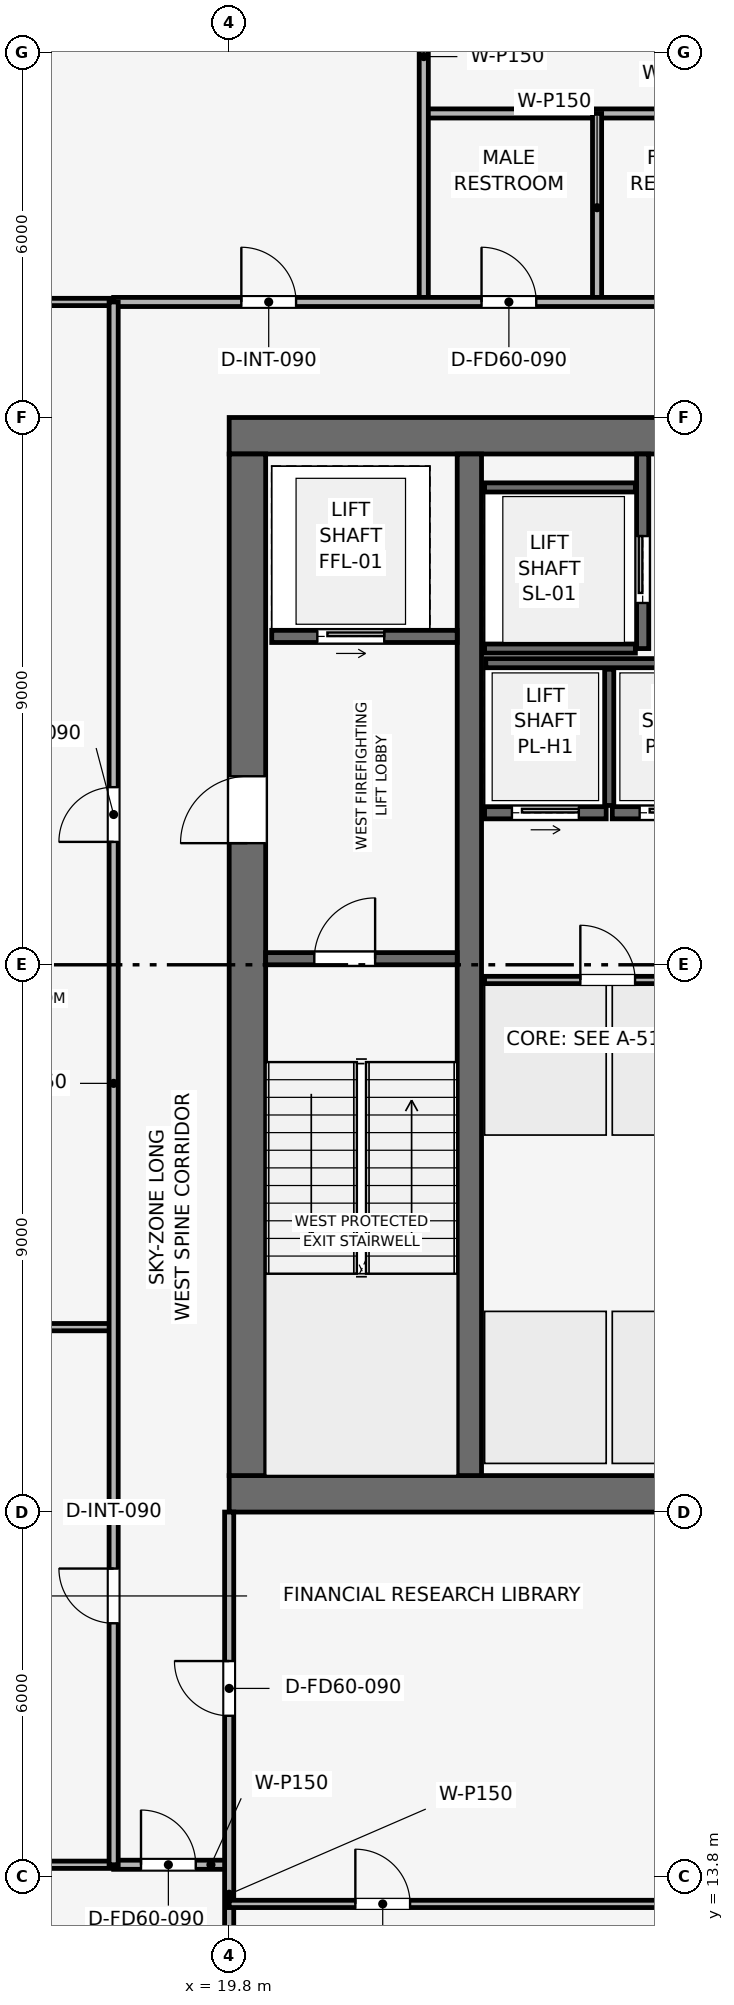
"""IFC4 building model, lengths in metres.
Left out: names, types, materials, properties, quantities, classifications, styles, units other than length and angle.
Written with IfcOpenShell. Run it as: python <this file> out.ifc"""

import sys

from ifc_helpers import new_model, si_unit, direction, frame, frame_2d, origin, place, context, subcontext, project, spatial, rectangle, extrude, element, fill, save


model = new_model("IFC4")
c1 = context("Model", 3, precision=1e-05, world=origin(), true_north=direction((0.0, 1.0)))
c2 = subcontext(c1, "Body", "Model", "MODEL_VIEW")
j1 = project(units=[si_unit("LENGTHUNIT", "METRE"), si_unit("PLANEANGLEUNIT", "RADIAN")], contexts=[c1])
p1 = place(None, origin())
s1 = spatial("IfcSite", under=j1, at=p1, CompositionType="ELEMENT")
p2 = place(p1, origin())
s2 = spatial("IfcBuilding", under=s1, at=p2, CompositionType="ELEMENT")
p3 = place(p2, frame((0.0, 0.0, 364.5)))
s3 = spatial("IfcBuildingStorey", under=s2, at=p3, CompositionType="ELEMENT", Elevation=364.5)
p4 = place(p3, frame((19.8, 20.1, 0.0), z_axis=(0.0, 0.0, 1.0), x_axis=(1.0, 0.0, 0.0)))
e1 = element("IfcWall", 1, at=p4, inside=s3, PredefinedType="SHEAR", context=c2, shape_type="SweptSolid", body=[
    extrude(rectangle(XDim=18.0, YDim=0.6, at=frame_2d((9.0, 0.0))), origin(), (0.0, 0.0, 1.0), 4.5),
])
p5 = place(p3, frame((19.8, 37.5, 0.0), z_axis=(0.0, 0.0, 1.0), x_axis=(1.0, 0.0, 0.0)))
e2 = element("IfcWall", 2, at=p5, inside=s3, PredefinedType="SHEAR", context=c2, shape_type="SweptSolid", body=[
    extrude(rectangle(XDim=18.0, YDim=0.6, at=frame_2d((9.0, 0.0))), origin(), (0.0, 0.0, 1.0), 4.5),
])
p6 = place(p5, frame((7.05, 0.0, 0.0)))
e3 = element("IfcOpeningElement", 3, at=p6, cuts=e2, PredefinedType="OPENING", context=c2, shape_type="SweptSolid", body=[
    extrude(rectangle(XDim=1.1, YDim=2.15, at=frame_2d((0.55, 1.075))), frame((0.0, 0.31, 0.0), z_axis=(0.0, -1.0, 0.0), x_axis=(1.0, 0.0, 0.0)), (0.0, 0.0, 1.0), 0.62),
])
p7 = place(p3, frame((20.1, 20.4, 0.0), z_axis=(0.0, 0.0, 1.0), x_axis=(0.0, 1.0, 0.0)))
e4 = element("IfcWall", 4, at=p7, inside=s3, PredefinedType="SHEAR", context=c2, shape_type="SweptSolid", body=[
    extrude(rectangle(XDim=16.8, YDim=0.6, at=frame_2d((8.4, 0.0))), origin(), (0.0, 0.0, 1.0), 4.5),
])
p8 = place(p7, frame((10.4, 0.0, 0.0)))
e5 = element("IfcOpeningElement", 5, at=p8, cuts=e4, PredefinedType="OPENING", context=c2, shape_type="SweptSolid", body=[
    extrude(rectangle(XDim=1.1, YDim=2.15, at=frame_2d((0.55, 1.075))), frame((0.0, 0.31, 0.0), z_axis=(0.0, -1.0, 0.0), x_axis=(1.0, 0.0, 0.0)), (0.0, 0.0, 1.0), 0.62),
])
p9 = place(p3, frame((23.75, 20.4, 0.0), z_axis=(0.0, 0.0, 1.0), x_axis=(0.0, 1.0, 0.0)))
e6 = element("IfcWall", 6, at=p9, inside=s3, PredefinedType="SHEAR", context=c2, shape_type="SweptSolid", body=[
    extrude(rectangle(XDim=16.8, YDim=0.4, at=frame_2d((8.4, 0.0))), origin(), (0.0, 0.0, 1.0), 4.5),
])
p10 = place(p3, frame((20.4, 28.9, 0.0), z_axis=(0.0, 0.0, 1.0), x_axis=(1.0, 0.0, 0.0)))
e7 = element("IfcWall", 7, at=p10, inside=s3, PredefinedType="SHEAR", context=c2, shape_type="SweptSolid", body=[
    extrude(rectangle(XDim=3.15, YDim=0.2, at=frame_2d((1.575, 0.0))), origin(), (0.0, 0.0, 1.0), 4.2),
])
p11 = place(p10, frame((0.8, 0.0, 0.0)))
e8 = element("IfcOpeningElement", 8, at=p11, cuts=e7, PredefinedType="OPENING", context=c2, shape_type="SweptSolid", body=[
    extrude(rectangle(XDim=1.0, YDim=2.1, at=frame_2d((0.5, 1.05))), frame((0.0, 0.11, 0.0), z_axis=(0.0, -1.0, 0.0), x_axis=(1.0, 0.0, 0.0)), (0.0, 0.0, 1.0), 0.22),
])
p12 = place(p3, frame((20.5, 34.2, 0.0), z_axis=(0.0, 0.0, 1.0), x_axis=(1.0, 0.0, 0.0)))
e9 = element("IfcWall", 9, at=p12, inside=s3, PredefinedType="SHEAR", context=c2, shape_type="SweptSolid", body=[
    extrude(rectangle(XDim=3.05, YDim=0.2, at=frame_2d((1.525, 0.0))), origin(), (0.0, 0.0, 1.0), 4.2),
])
p13 = place(p12, frame((0.75, 0.0, 0.0)))
e10 = element("IfcOpeningElement", 10, at=p13, cuts=e9, PredefinedType="OPENING", context=c2, shape_type="SweptSolid", body=[
    extrude(rectangle(XDim=1.1, YDim=2.15, at=frame_2d((0.55, 1.075))), frame((0.0, 0.11, 0.0), z_axis=(0.0, -1.0, 0.0), x_axis=(1.0, 0.0, 0.0)), (0.0, 0.0, 1.0), 0.22),
])
p14 = place(p3, frame((26.6, 34.0, 0.0), z_axis=(0.0, 0.0, 1.0), x_axis=(0.0, 1.0, 0.0)))
e11 = element("IfcWall", 11, at=p14, inside=s3, PredefinedType="SHEAR", context=c2, shape_type="SweptSolid", body=[
    extrude(rectangle(XDim=3.2, YDim=0.2, at=frame_2d((1.6, 0.0))), origin(), (0.0, 0.0, 1.0), 4.2),
])
p15 = place(p14, frame((0.75, 0.0, 0.0)))
e12 = element("IfcOpeningElement", 12, at=p15, cuts=e11, PredefinedType="OPENING", context=c2, shape_type="SweptSolid", body=[
    extrude(rectangle(XDim=1.1, YDim=2.15, at=frame_2d((0.55, 1.075))), frame((0.0, 0.11, 0.0), z_axis=(0.0, -1.0, 0.0), x_axis=(1.0, 0.0, 0.0)), (0.0, 0.0, 1.0), 0.22),
])
for number, where, z_axis, x_axis in (
    (13, (24.0, 34.0, 0.0), (0.0, 0.0, 1.0), (1.0, 0.0, 0.0)),
    (14, (24.0, 36.65, 0.0), (0.0, 0.0, 1.0), (1.0, 0.0, 0.0)),
):
    element("IfcWall", number, at=place(p3, frame(where, z_axis=z_axis, x_axis=x_axis)), inside=s3, PredefinedType="SHEAR", context=c2, shape_type="SweptSolid", body=[
        extrude(rectangle(XDim=2.48, YDim=0.15, at=frame_2d((1.24, 0.0))), origin(), (0.0, 0.0, 1.0), 4.2),
    ])
p16 = place(p3, frame((24.0, 31.3, 0.0), z_axis=(0.0, 0.0, 1.0), x_axis=(1.0, 0.0, 0.0)))
e15 = element("IfcWall", 15, at=p16, inside=s3, PredefinedType="SHEAR", context=c2, shape_type="SweptSolid", body=[
    extrude(rectangle(XDim=2.0, YDim=0.2, at=frame_2d((1.0, 0.0))), origin(), (0.0, 0.0, 1.0), 4.2),
])
p17 = place(p16, frame((0.45, 0.0, 0.0)))
e16 = element("IfcOpeningElement", 16, at=p17, cuts=e15, PredefinedType="OPENING", context=c2, shape_type="SweptSolid", body=[
    extrude(rectangle(XDim=1.1, YDim=2.15, at=frame_2d((0.55, 1.075))), frame((0.0, 0.11, 0.0), z_axis=(0.0, -1.0, 0.0), x_axis=(1.0, 0.0, 0.0)), (0.0, 0.0, 1.0), 0.22),
])
p18 = place(p3, frame((26.1, 31.3, 0.0), z_axis=(0.0, 0.0, 1.0), x_axis=(1.0, 0.0, 0.0)))
e17 = element("IfcWall", 17, at=p18, inside=s3, PredefinedType="SHEAR", context=c2, shape_type="SweptSolid", body=[
    extrude(rectangle(XDim=2.0, YDim=0.2, at=frame_2d((1.0, 0.0))), origin(), (0.0, 0.0, 1.0), 4.2),
])
p19 = place(p18, frame((0.45, 0.0, 0.0)))
e18 = element("IfcOpeningElement", 18, at=p19, cuts=e17, PredefinedType="OPENING", context=c2, shape_type="SweptSolid", body=[
    extrude(rectangle(XDim=1.1, YDim=2.15, at=frame_2d((0.55, 1.075))), frame((0.0, 0.11, 0.0), z_axis=(0.0, -1.0, 0.0), x_axis=(1.0, 0.0, 0.0)), (0.0, 0.0, 1.0), 0.22),
])
p20 = place(p3, frame((24.02, 33.76, 0.0), z_axis=(0.0, 0.0, 1.0), x_axis=(1.0, 0.0, 0.0)))
e19 = element("IfcWall", 19, at=p20, inside=s3, PredefinedType="SHEAR", context=c2, shape_type="SweptSolid", body=[
    extrude(rectangle(XDim=4.08, YDim=0.15, at=frame_2d((2.04, 0.0))), origin(), (0.0, 0.0, 1.0), 4.2),
])
p21 = place(p3, frame((26.05, 31.42, 0.0), z_axis=(0.0, 0.0, 1.0), x_axis=(0.0, 1.0, 0.0)))
e20 = element("IfcWall", 20, at=p21, inside=s3, PredefinedType="SHEAR", context=c2, shape_type="SweptSolid", body=[
    extrude(rectangle(XDim=2.24, YDim=0.15, at=frame_2d((1.12, 0.0))), origin(), (0.0, 0.0, 1.0), 4.2),
])
p22 = place(p3, frame((24.0, 28.55, 0.0), z_axis=(0.0, 0.0, 1.0), x_axis=(1.0, 0.0, 0.0)))
e21 = element("IfcWall", 21, at=p22, inside=s3, PredefinedType="PARTITIONING", context=c2, shape_type="SweptSolid", body=[
    extrude(rectangle(XDim=4.05, YDim=0.12, at=frame_2d((2.025, 0.0))), origin(), (0.0, 0.0, 1.0), 4.2),
])
p23 = place(p22, frame((1.575, 0.0, 0.0)))
e22 = element("IfcOpeningElement", 22, at=p23, cuts=e21, PredefinedType="OPENING", context=c2, shape_type="SweptSolid", body=[
    extrude(rectangle(XDim=0.9, YDim=2.1, at=frame_2d((0.45, 1.05))), frame((0.0, 0.07, 0.0), z_axis=(0.0, -1.0, 0.0), x_axis=(1.0, 0.0, 0.0)), (0.0, 0.0, 1.0), 0.14),
])
p24 = place(p3, frame((23.0, 42.8, 0.0), z_axis=(0.0, 0.0, 1.0), x_axis=(1.0, 0.0, 0.0)))
e23 = element("IfcWall", 23, at=p24, inside=s3, PredefinedType="PARTITIONING", context=c2, shape_type="SweptSolid", body=[
    extrude(rectangle(XDim=8.4, YDim=0.15, at=frame_2d((4.2, 0.0))), origin(), (0.0, 0.0, 1.0), 3.285),
])
p25 = place(p3, frame((23.0, 39.7, 0.0), z_axis=(0.0, 0.0, 1.0), x_axis=(0.0, 1.0, 0.0)))
e24 = element("IfcWall", 24, at=p25, inside=s3, PredefinedType="PARTITIONING", context=c2, shape_type="SweptSolid", body=[
    extrude(rectangle(XDim=9.37, YDim=0.15, at=frame_2d((4.685, 0.0))), origin(), (0.0, 0.0, 1.0), 3.825),
])
p26 = place(p25, frame((5.785, 0.0, 0.0)))
e25 = element("IfcOpeningElement", 25, at=p26, cuts=e24, PredefinedType="OPENING", context=c2, shape_type="SweptSolid", body=[
    extrude(rectangle(XDim=0.9, YDim=2.1, at=frame_2d((0.45, 1.05))), frame((0.0, 0.085, 0.0), z_axis=(0.0, -1.0, 0.0), x_axis=(1.0, 0.0, 0.0)), (0.0, 0.0, 1.0), 0.17),
])
p27 = place(p3, frame((25.85, 39.7, 0.0), z_axis=(0.0, 0.0, 1.0), x_axis=(0.0, 1.0, 0.0)))
e26 = element("IfcWall", 26, at=p27, inside=s3, PredefinedType="PARTITIONING", context=c2, shape_type="SweptSolid", body=[
    extrude(rectangle(XDim=3.1, YDim=0.15, at=frame_2d((1.55, 0.0))), origin(), (0.0, 0.0, 1.0), 3.825),
])
p28 = place(p3, frame((8.53, 22.841, 0.0), z_axis=(0.0, 0.0, 1.0), x_axis=(1.0, 0.0, 0.0)))
e27 = element("IfcWall", 27, at=p28, inside=s3, PredefinedType="PARTITIONING", context=c2, shape_type="SweptSolid", body=[
    extrude(rectangle(XDim=9.37, YDim=0.12, at=frame_2d((4.685, 0.0))), origin(), (0.0, 0.0, 1.0), 3.825),
])
p29 = place(p3, frame((14.0, 14.0, 0.0), z_axis=(0.0, 0.0, 1.0), x_axis=(1.0, 0.0, 0.0)))
e28 = element("IfcWall", 28, at=p29, inside=s3, PredefinedType="PARTITIONING", context=c2, shape_type="SweptSolid", body=[
    extrude(rectangle(XDim=3.9, YDim=0.12, at=frame_2d((1.95, 0.0))), origin(), (0.0, 0.0, 1.0), 3.885),
])
p30 = place(p3, frame((17.9, 14.0, 0.0), z_axis=(0.0, 0.0, 1.0), x_axis=(1.0, 0.0, 0.0)))
e29 = element("IfcWall", 29, at=p30, inside=s3, PredefinedType="PARTITIONING", context=c2, shape_type="SweptSolid", body=[
    extrude(rectangle(XDim=1.9, YDim=0.15, at=frame_2d((0.95, 0.0))), origin(), (0.0, 0.0, 1.0), 4.2),
])
p31 = place(p30, frame((0.45, 0.0, 0.0)))
e30 = element("IfcOpeningElement", 30, at=p31, cuts=e29, PredefinedType="OPENING", context=c2, shape_type="SweptSolid", body=[
    extrude(rectangle(XDim=0.9, YDim=2.1, at=frame_2d((0.45, 1.05))), frame((0.0, 0.085, 0.0), z_axis=(0.0, -1.0, 0.0), x_axis=(1.0, 0.0, 0.0)), (0.0, 0.0, 1.0), 0.17),
])
p32 = place(p3, frame((19.8, 8.53, 0.0), z_axis=(0.0, 0.0, 1.0), x_axis=(0.0, 1.0, 0.0)))
e31 = element("IfcWall", 31, at=p32, inside=s3, PredefinedType="PARTITIONING", context=c2, shape_type="SweptSolid", body=[
    extrude(rectangle(XDim=11.27, YDim=0.15, at=frame_2d((5.635, 0.0))), origin(), (0.0, 0.0, 1.0), 3.785),
])
p33 = place(p32, frame((7.92, 0.0, 0.0)))
e32 = element("IfcOpeningElement", 32, at=p33, cuts=e31, PredefinedType="OPENING", context=c2, shape_type="SweptSolid", body=[
    extrude(rectangle(XDim=0.9, YDim=2.1, at=frame_2d((0.45, 1.05))), frame((0.0, 0.085, 0.0), z_axis=(0.0, -1.0, 0.0), x_axis=(1.0, 0.0, 0.0)), (0.0, 0.0, 1.0), 0.17),
])
p34 = place(p3, frame((19.8, 13.356, 0.0), z_axis=(0.0, 0.0, 1.0), x_axis=(1.0, 0.0, 0.0)))
e33 = element("IfcWall", 33, at=p34, inside=s3, PredefinedType="PARTITIONING", context=c2, shape_type="SweptSolid", body=[
    extrude(rectangle(XDim=23.8, YDim=0.12, at=frame_2d((11.9, 0.0))), origin(), (0.0, 0.0, 1.0), 3.285),
])
p35 = place(p34, frame((2.075, 0.0, 0.0)))
e34 = element("IfcOpeningElement", 34, at=p35, cuts=e33, PredefinedType="OPENING", context=c2, shape_type="SweptSolid", body=[
    extrude(rectangle(XDim=0.9, YDim=2.1, at=frame_2d((0.45, 1.05))), frame((0.0, 0.07, 0.0), z_axis=(0.0, -1.0, 0.0), x_axis=(1.0, 0.0, 0.0)), (0.0, 0.0, 1.0), 0.14),
])
p36 = place(p3, frame((8.53, 39.7, 0.0), z_axis=(0.0, 0.0, 1.0), x_axis=(1.0, 0.0, 0.0)))
e35 = element("IfcWall", 35, at=p36, inside=s3, PredefinedType="PARTITIONING", context=c2, shape_type="SweptSolid", body=[
    extrude(rectangle(XDim=9.37, YDim=0.12, at=frame_2d((4.685, 0.0))), origin(), (0.0, 0.0, 1.0), 3.785),
])
p37 = place(p3, frame((17.9, 39.7, 0.0), z_axis=(0.0, 0.0, 1.0), x_axis=(1.0, 0.0, 0.0)))
e36 = element("IfcWall", 36, at=p37, inside=s3, PredefinedType="PARTITIONING", context=c2, shape_type="SweptSolid", body=[
    extrude(rectangle(XDim=21.8, YDim=0.15, at=frame_2d((10.9, 0.0))), origin(), (0.0, 0.0, 1.0), 3.285),
])
p38 = place(p37, frame((2.1, 0.0, 0.0)))
e37 = element("IfcOpeningElement", 37, at=p38, cuts=e36, PredefinedType="OPENING", context=c2, shape_type="SweptSolid", body=[
    extrude(rectangle(XDim=0.9, YDim=2.1, at=frame_2d((0.45, 1.05))), frame((0.0, 0.085, 0.0), z_axis=(0.0, -1.0, 0.0), x_axis=(1.0, 0.0, 0.0)), (0.0, 0.0, 1.0), 0.17),
])
p39 = place(p37, frame((6.05, 0.0, 0.0)))
e38 = element("IfcOpeningElement", 38, at=p39, cuts=e36, PredefinedType="OPENING", context=c2, shape_type="SweptSolid", body=[
    extrude(rectangle(XDim=0.9, YDim=2.1, at=frame_2d((0.45, 1.05))), frame((0.0, 0.085, 0.0), z_axis=(0.0, -1.0, 0.0), x_axis=(1.0, 0.0, 0.0)), (0.0, 0.0, 1.0), 0.17),
])
p40 = place(p37, frame((8.95, 0.0, 0.0)))
e39 = element("IfcOpeningElement", 39, at=p40, cuts=e36, PredefinedType="OPENING", context=c2, shape_type="SweptSolid", body=[
    extrude(rectangle(XDim=0.9, YDim=2.1, at=frame_2d((0.45, 1.05))), frame((0.0, 0.085, 0.0), z_axis=(0.0, -1.0, 0.0), x_axis=(1.0, 0.0, 0.0)), (0.0, 0.0, 1.0), 0.17),
])
p41 = place(p37, frame((11.7, 0.0, 0.0)))
e40 = element("IfcOpeningElement", 40, at=p41, cuts=e36, PredefinedType="OPENING", context=c2, shape_type="SweptSolid", body=[
    extrude(rectangle(XDim=0.95, YDim=2.1, at=frame_2d((0.475, 1.05))), frame((0.0, 0.085, 0.0), z_axis=(0.0, -1.0, 0.0), x_axis=(1.0, 0.0, 0.0)), (0.0, 0.0, 1.0), 0.17),
])
p42 = place(p37, frame((17.2, 0.0, 0.0)))
e41 = element("IfcOpeningElement", 41, at=p42, cuts=e36, PredefinedType="OPENING", context=c2, shape_type="SweptSolid", body=[
    extrude(rectangle(XDim=0.9, YDim=2.1, at=frame_2d((0.45, 1.05))), frame((0.0, 0.085, 0.0), z_axis=(0.0, -1.0, 0.0), x_axis=(1.0, 0.0, 0.0)), (0.0, 0.0, 1.0), 0.17),
])
p43 = place(p3, frame((17.9, 14.0, 0.0), z_axis=(0.0, 0.0, 1.0), x_axis=(0.0, 1.0, 0.0)))
e42 = element("IfcWall", 42, at=p43, inside=s3, PredefinedType="PARTITIONING", context=c2, shape_type="SweptSolid", body=[
    extrude(rectangle(XDim=25.7, YDim=0.15, at=frame_2d((12.85, 0.0))), origin(), (0.0, 0.0, 1.0), 3.285),
])
p44 = place(p43, frame((3.971, 0.0, 0.0)))
e43 = element("IfcOpeningElement", 43, at=p44, cuts=e42, PredefinedType="OPENING", context=c2, shape_type="SweptSolid", body=[
    extrude(rectangle(XDim=0.9, YDim=2.1, at=frame_2d((0.45, 1.05))), frame((0.0, 0.085, 0.0), z_axis=(0.0, -1.0, 0.0), x_axis=(1.0, 0.0, 0.0)), (0.0, 0.0, 1.0), 0.17),
])
p45 = place(p43, frame((16.821, 0.0, 0.0)))
e44 = element("IfcOpeningElement", 44, at=p45, cuts=e42, PredefinedType="OPENING", context=c2, shape_type="SweptSolid", body=[
    extrude(rectangle(XDim=0.9, YDim=2.1, at=frame_2d((0.45, 1.05))), frame((0.0, 0.085, 0.0), z_axis=(0.0, -1.0, 0.0), x_axis=(1.0, 0.0, 0.0)), (0.0, 0.0, 1.0), 0.17),
])
p46 = place(p11, origin())
e45 = element("IfcDoor", 45, at=p46, inside=s3, OperationType="SINGLE_SWING_RIGHT", PredefinedType="DOOR", context=c2, shape_type="SweptSolid", body=[
    extrude(rectangle(XDim=1.0, YDim=2.1, at=frame_2d((0.5, 1.05))), frame((0.0, 0.025, 0.0), z_axis=(0.0, -1.0, 0.0), x_axis=(1.0, 0.0, 0.0)), (0.0, 0.0, 1.0), 0.05),
])
fill(e8, e45)
p47 = place(p13, origin())
e46 = element("IfcDoor", 46, at=p47, inside=s3, OperationType="SLIDING_TO_RIGHT", PredefinedType="DOOR", context=c2, shape_type="SweptSolid", body=[
    extrude(rectangle(XDim=1.1, YDim=2.15, at=frame_2d((0.55, 1.075))), frame((0.0, 0.025, 0.0), z_axis=(0.0, -1.0, 0.0), x_axis=(1.0, 0.0, 0.0)), (0.0, 0.0, 1.0), 0.05),
])
fill(e10, e46)
p48 = place(p15, origin())
e47 = element("IfcDoor", 47, at=p48, inside=s3, OperationType="SLIDING_TO_RIGHT", PredefinedType="DOOR", context=c2, shape_type="SweptSolid", body=[
    extrude(rectangle(XDim=1.1, YDim=2.15, at=frame_2d((0.55, 1.075))), frame((0.0, 0.025, 0.0), z_axis=(0.0, -1.0, 0.0), x_axis=(1.0, 0.0, 0.0)), (0.0, 0.0, 1.0), 0.05),
])
fill(e12, e47)
p49 = place(p17, origin())
e48 = element("IfcDoor", 48, at=p49, inside=s3, OperationType="SLIDING_TO_RIGHT", PredefinedType="DOOR", context=c2, shape_type="SweptSolid", body=[
    extrude(rectangle(XDim=1.1, YDim=2.15, at=frame_2d((0.55, 1.075))), frame((0.0, 0.025, 0.0), z_axis=(0.0, -1.0, 0.0), x_axis=(1.0, 0.0, 0.0)), (0.0, 0.0, 1.0), 0.05),
])
fill(e16, e48)
p50 = place(p19, origin())
e49 = element("IfcDoor", 49, at=p50, inside=s3, OperationType="SLIDING_TO_RIGHT", PredefinedType="DOOR", context=c2, shape_type="SweptSolid", body=[
    extrude(rectangle(XDim=1.1, YDim=2.15, at=frame_2d((0.55, 1.075))), frame((0.0, 0.025, 0.0), z_axis=(0.0, -1.0, 0.0), x_axis=(1.0, 0.0, 0.0)), (0.0, 0.0, 1.0), 0.05),
])
fill(e18, e49)
p51 = place(p23, origin())
e50 = element("IfcDoor", 50, at=p51, inside=s3, OperationType="SINGLE_SWING_LEFT", PredefinedType="DOOR", context=c2, shape_type="SweptSolid", body=[
    extrude(rectangle(XDim=0.9, YDim=2.1, at=frame_2d((0.45, 1.05))), frame((0.0, 0.025, 0.0), z_axis=(0.0, -1.0, 0.0), x_axis=(1.0, 0.0, 0.0)), (0.0, 0.0, 1.0), 0.05),
])
fill(e22, e50)
p52 = place(p31, origin())
e51 = element("IfcDoor", 51, at=p52, inside=s3, OperationType="SINGLE_SWING_LEFT", PredefinedType="DOOR", context=c2, shape_type="SweptSolid", body=[
    extrude(rectangle(XDim=0.9, YDim=2.1, at=frame_2d((0.45, 1.05))), frame((0.0, 0.025, 0.0), z_axis=(0.0, -1.0, 0.0), x_axis=(1.0, 0.0, 0.0)), (0.0, 0.0, 1.0), 0.05),
])
fill(e30, e51)
p53 = place(p33, origin())
e52 = element("IfcDoor", 52, at=p53, inside=s3, OperationType="SINGLE_SWING_RIGHT", PredefinedType="DOOR", context=c2, shape_type="SweptSolid", body=[
    extrude(rectangle(XDim=0.9, YDim=2.1, at=frame_2d((0.45, 1.05))), frame((0.0, 0.025, 0.0), z_axis=(0.0, -1.0, 0.0), x_axis=(1.0, 0.0, 0.0)), (0.0, 0.0, 1.0), 0.05),
])
fill(e32, e52)
p54 = place(p35, origin())
e53 = element("IfcDoor", 53, at=p54, inside=s3, OperationType="SINGLE_SWING_LEFT", PredefinedType="DOOR", context=c2, shape_type="SweptSolid", body=[
    extrude(rectangle(XDim=0.9, YDim=2.1, at=frame_2d((0.45, 1.05))), frame((0.0, 0.025, 0.0), z_axis=(0.0, -1.0, 0.0), x_axis=(1.0, 0.0, 0.0)), (0.0, 0.0, 1.0), 0.05),
])
fill(e34, e53)
p55 = place(p38, origin())
e54 = element("IfcDoor", 54, at=p55, inside=s3, OperationType="SINGLE_SWING_LEFT", PredefinedType="DOOR", context=c2, shape_type="SweptSolid", body=[
    extrude(rectangle(XDim=0.9, YDim=2.1, at=frame_2d((0.45, 1.05))), frame((0.0, 0.025, 0.0), z_axis=(0.0, -1.0, 0.0), x_axis=(1.0, 0.0, 0.0)), (0.0, 0.0, 1.0), 0.05),
])
fill(e37, e54)
p56 = place(p39, origin())
e55 = element("IfcDoor", 55, at=p56, inside=s3, OperationType="SINGLE_SWING_LEFT", PredefinedType="DOOR", context=c2, shape_type="SweptSolid", body=[
    extrude(rectangle(XDim=0.9, YDim=2.1, at=frame_2d((0.45, 1.05))), frame((0.0, 0.025, 0.0), z_axis=(0.0, -1.0, 0.0), x_axis=(1.0, 0.0, 0.0)), (0.0, 0.0, 1.0), 0.05),
])
fill(e38, e55)
p57 = place(p44, origin())
e56 = element("IfcDoor", 56, at=p57, inside=s3, OperationType="SINGLE_SWING_RIGHT", PredefinedType="DOOR", context=c2, shape_type="SweptSolid", body=[
    extrude(rectangle(XDim=0.9, YDim=2.1, at=frame_2d((0.45, 1.05))), frame((0.0, 0.025, 0.0), z_axis=(0.0, -1.0, 0.0), x_axis=(1.0, 0.0, 0.0)), (0.0, 0.0, 1.0), 0.05),
])
fill(e43, e56)
p58 = place(p45, origin())
e57 = element("IfcDoor", 57, at=p58, inside=s3, OperationType="SINGLE_SWING_LEFT", PredefinedType="DOOR", context=c2, shape_type="SweptSolid", body=[
    extrude(rectangle(XDim=0.9, YDim=2.1, at=frame_2d((0.45, 1.05))), frame((0.0, 0.025, 0.0), z_axis=(0.0, -1.0, 0.0), x_axis=(1.0, 0.0, 0.0)), (0.0, 0.0, 1.0), 0.05),
])
fill(e44, e57)
p59 = place(p8, origin())
e58 = element("IfcDoor", 58, at=p59, inside=s3, OperationType="SINGLE_SWING_LEFT", PredefinedType="DOOR", context=c2, shape_type="SweptSolid", body=[
    extrude(rectangle(XDim=1.1, YDim=2.15, at=frame_2d((0.55, 1.075))), frame((0.0, 0.025, 0.0), z_axis=(0.0, -1.0, 0.0), x_axis=(1.0, 0.0, 0.0)), (0.0, 0.0, 1.0), 0.05),
])
fill(e5, e58)
save(model, sys.argv[1])
